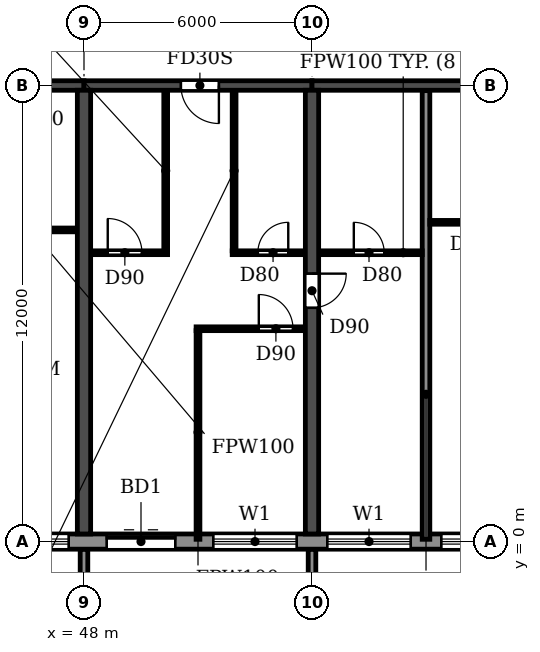
"""IFC4 building model, lengths in metres.
Left out: names, types, materials, properties, quantities, classifications, styles, units other than length and angle.
Written with IfcOpenShell. Run it as: python <this file> out.ifc"""

import sys

from ifc_helpers import new_model, si_unit, direction, frame, frame_2d, origin, place, context, subcontext, project, spatial, polyline, rectangle, outline, extrude, source, transform, mapped, element, fill, save


model = new_model("IFC4")
c1 = context("Model", 3, precision=1e-05, world=origin(), true_north=direction((0.0, 1.0)))
c2 = subcontext(c1, "Body", "Model", "MODEL_VIEW")
j1 = project(units=[si_unit("LENGTHUNIT", "METRE"), si_unit("PLANEANGLEUNIT", "RADIAN")], contexts=[c1])
p1 = place(None, origin())
s1 = spatial("IfcSite", under=j1, at=p1, CompositionType="ELEMENT")
p2 = place(p1, origin())
s2 = spatial("IfcBuilding", under=s1, at=p2, CompositionType="ELEMENT")
p3 = place(p2, frame((0.0, 0.0, 76.2)))
s3 = spatial("IfcBuildingStorey", under=s2, at=p3, CompositionType="ELEMENT", Elevation=76.2)
p4 = place(p3, frame((48.0, 0.2, 0.0), z_axis=(0.0, 0.0, 1.0), x_axis=(0.0, 1.0, 0.0)))
e1 = element("IfcWall", 1, at=p4, inside=s3, PredefinedType="SHEAR", context=c2, shape_type="SweptSolid", body=[
    extrude(rectangle(XDim=11.675, YDim=0.35, at=frame_2d((5.837, 0.0))), origin(), (0.0, 0.0, 1.0), 3.06),
])
p5 = place(p3, frame((54.0, 0.2, 0.0), z_axis=(0.0, 0.0, 1.0), x_axis=(0.0, 1.0, 0.0)))
e2 = element("IfcWall", 2, at=p5, inside=s3, PredefinedType="SHEAR", context=c2, shape_type="SweptSolid", body=[
    extrude(rectangle(XDim=11.675, YDim=0.35, at=frame_2d((5.837, 0.0))), origin(), (0.0, 0.0, 1.0), 3.06),
])
p6 = place(p5, frame((5.95, 0.0, 0.0)))
e3 = element("IfcOpeningElement", 3, at=p6, cuts=e2, PredefinedType="OPENING", context=c2, shape_type="SweptSolid", body=[
    extrude(rectangle(XDim=0.9, YDim=2.1, at=frame_2d((0.45, 1.05))), frame((0.0, 0.185, 0.0), z_axis=(0.0, -1.0, 0.0), x_axis=(1.0, 0.0, 0.0)), (0.0, 0.0, 1.0), 0.37),
])
p7 = place(p3, frame((42.0, 12.0, 0.0), z_axis=(0.0, 0.0, 1.0), x_axis=(1.0, 0.0, 0.0)))
e4 = element("IfcWall", 4, at=p7, inside=s3, PredefinedType="SHEAR", context=c2, shape_type="SweptSolid", body=[
    extrude(rectangle(XDim=6.0, YDim=0.25, at=frame_2d((3.0, 0.0))), origin(), (0.0, 0.0, 1.0), 2.46),
])
p8 = place(p7, frame((2.55, 0.0, 0.0)))
e5 = element("IfcOpeningElement", 5, at=p8, cuts=e4, PredefinedType="OPENING", context=c2, shape_type="SweptSolid", body=[
    extrude(rectangle(XDim=1.0, YDim=2.1, at=frame_2d((0.5, 1.05))), frame((0.0, 0.135, 0.0), z_axis=(0.0, -1.0, 0.0), x_axis=(1.0, 0.0, 0.0)), (0.0, 0.0, 1.0), 0.27),
])
p9 = place(p3, frame((48.0, 12.0, 0.0), z_axis=(0.0, 0.0, 1.0), x_axis=(1.0, 0.0, 0.0)))
e6 = element("IfcWall", 6, at=p9, inside=s3, PredefinedType="SHEAR", context=c2, shape_type="SweptSolid", body=[
    extrude(rectangle(XDim=6.0, YDim=0.25, at=frame_2d((3.0, 0.0))), origin(), (0.0, 0.0, 1.0), 2.46),
])
p10 = place(p9, frame((2.55, 0.0, 0.0)))
e7 = element("IfcOpeningElement", 7, at=p10, cuts=e6, PredefinedType="OPENING", context=c2, shape_type="SweptSolid", body=[
    extrude(rectangle(XDim=1.0, YDim=2.1, at=frame_2d((0.5, 1.05))), frame((0.0, 0.135, 0.0), z_axis=(0.0, -1.0, 0.0), x_axis=(1.0, 0.0, 0.0)), (0.0, 0.0, 1.0), 0.27),
])
p11 = place(p3, frame((54.0, 12.0, 0.0), z_axis=(0.0, 0.0, 1.0), x_axis=(1.0, 0.0, 0.0)))
e8 = element("IfcWall", 8, at=p11, inside=s3, PredefinedType="SHEAR", context=c2, shape_type="SweptSolid", body=[
    extrude(rectangle(XDim=6.0, YDim=0.25, at=frame_2d((3.0, 0.0))), origin(), (0.0, 0.0, 1.0), 2.46),
])
p12 = place(p3, frame((10.683, 0.0, 0.0), z_axis=(0.0, 0.0, 1.0), x_axis=(1.0, 0.0, 0.0)))
e9 = element("IfcWall", 9, at=p12, inside=s3, PredefinedType="STANDARD", context=c2, shape_type="SweptSolid", body=[
    extrude(rectangle(XDim=80.634, YDim=0.4, at=frame_2d((40.317, 0.0))), origin(), (0.0, 0.0, 1.0), 3.06),
])
p13 = place(p12, frame((1.717, 0.0, 0.9)))
e10 = element("IfcOpeningElement", 10, at=p13, cuts=e9, PredefinedType="OPENING", context=c2, shape_type="SweptSolid", body=[
    extrude(rectangle(XDim=2.2, YDim=1.5, at=frame_2d((1.1, 0.75))), frame((0.0, 0.21, 0.0), z_axis=(0.0, -1.0, 0.0), x_axis=(1.0, 0.0, 0.0)), (0.0, 0.0, 1.0), 0.42),
])
p14 = place(p12, frame((4.917, 0.0, 0.0)))
e11 = element("IfcOpeningElement", 11, at=p14, cuts=e9, PredefinedType="OPENING", context=c2, shape_type="SweptSolid", body=[
    extrude(rectangle(XDim=1.8, YDim=2.4, at=frame_2d((0.9, 1.2))), frame((0.0, 0.21, 0.0), z_axis=(0.0, -1.0, 0.0), x_axis=(1.0, 0.0, 0.0)), (0.0, 0.0, 1.0), 0.42),
])
p15 = place(p12, frame((7.717, 0.0, 0.9)))
e12 = element("IfcOpeningElement", 12, at=p15, cuts=e9, PredefinedType="OPENING", context=c2, shape_type="SweptSolid", body=[
    extrude(rectangle(XDim=2.2, YDim=1.5, at=frame_2d((1.1, 0.75))), frame((0.0, 0.21, 0.0), z_axis=(0.0, -1.0, 0.0), x_axis=(1.0, 0.0, 0.0)), (0.0, 0.0, 1.0), 0.42),
])
p16 = place(p12, frame((10.717, 0.0, 0.9)))
e13 = element("IfcOpeningElement", 13, at=p16, cuts=e9, PredefinedType="OPENING", context=c2, shape_type="SweptSolid", body=[
    extrude(rectangle(XDim=2.2, YDim=1.5, at=frame_2d((1.1, 0.75))), frame((0.0, 0.21, 0.0), z_axis=(0.0, -1.0, 0.0), x_axis=(1.0, 0.0, 0.0)), (0.0, 0.0, 1.0), 0.42),
])
p17 = place(p12, frame((13.717, 0.0, 0.9)))
e14 = element("IfcOpeningElement", 14, at=p17, cuts=e9, PredefinedType="OPENING", context=c2, shape_type="SweptSolid", body=[
    extrude(rectangle(XDim=2.2, YDim=1.5, at=frame_2d((1.1, 0.75))), frame((0.0, 0.21, 0.0), z_axis=(0.0, -1.0, 0.0), x_axis=(1.0, 0.0, 0.0)), (0.0, 0.0, 1.0), 0.42),
])
p18 = place(p12, frame((16.917, 0.0, 0.0)))
e15 = element("IfcOpeningElement", 15, at=p18, cuts=e9, PredefinedType="OPENING", context=c2, shape_type="SweptSolid", body=[
    extrude(rectangle(XDim=1.8, YDim=2.4, at=frame_2d((0.9, 1.2))), frame((0.0, 0.21, 0.0), z_axis=(0.0, -1.0, 0.0), x_axis=(1.0, 0.0, 0.0)), (0.0, 0.0, 1.0), 0.42),
])
p19 = place(p12, frame((19.717, 0.0, 0.9)))
e16 = element("IfcOpeningElement", 16, at=p19, cuts=e9, PredefinedType="OPENING", context=c2, shape_type="SweptSolid", body=[
    extrude(rectangle(XDim=2.2, YDim=1.5, at=frame_2d((1.1, 0.75))), frame((0.0, 0.21, 0.0), z_axis=(0.0, -1.0, 0.0), x_axis=(1.0, 0.0, 0.0)), (0.0, 0.0, 1.0), 0.42),
])
p20 = place(p12, frame((22.717, 0.0, 0.9)))
e17 = element("IfcOpeningElement", 17, at=p20, cuts=e9, PredefinedType="OPENING", context=c2, shape_type="SweptSolid", body=[
    extrude(rectangle(XDim=2.2, YDim=1.5, at=frame_2d((1.1, 0.75))), frame((0.0, 0.21, 0.0), z_axis=(0.0, -1.0, 0.0), x_axis=(1.0, 0.0, 0.0)), (0.0, 0.0, 1.0), 0.42),
])
p21 = place(p12, frame((25.917, 0.0, 0.0)))
e18 = element("IfcOpeningElement", 18, at=p21, cuts=e9, PredefinedType="OPENING", context=c2, shape_type="SweptSolid", body=[
    extrude(rectangle(XDim=1.8, YDim=2.4, at=frame_2d((0.9, 1.2))), frame((0.0, 0.21, 0.0), z_axis=(0.0, -1.0, 0.0), x_axis=(1.0, 0.0, 0.0)), (0.0, 0.0, 1.0), 0.42),
])
p22 = place(p12, frame((28.717, 0.0, 0.9)))
e19 = element("IfcOpeningElement", 19, at=p22, cuts=e9, PredefinedType="OPENING", context=c2, shape_type="SweptSolid", body=[
    extrude(rectangle(XDim=2.2, YDim=1.5, at=frame_2d((1.1, 0.75))), frame((0.0, 0.21, 0.0), z_axis=(0.0, -1.0, 0.0), x_axis=(1.0, 0.0, 0.0)), (0.0, 0.0, 1.0), 0.42),
])
p23 = place(p12, frame((31.717, 0.0, 0.9)))
e20 = element("IfcOpeningElement", 20, at=p23, cuts=e9, PredefinedType="OPENING", context=c2, shape_type="SweptSolid", body=[
    extrude(rectangle(XDim=2.2, YDim=1.5, at=frame_2d((1.1, 0.75))), frame((0.0, 0.21, 0.0), z_axis=(0.0, -1.0, 0.0), x_axis=(1.0, 0.0, 0.0)), (0.0, 0.0, 1.0), 0.42),
])
p24 = place(p12, frame((34.717, 0.0, 0.9)))
e21 = element("IfcOpeningElement", 21, at=p24, cuts=e9, PredefinedType="OPENING", context=c2, shape_type="SweptSolid", body=[
    extrude(rectangle(XDim=2.2, YDim=1.5, at=frame_2d((1.1, 0.75))), frame((0.0, 0.21, 0.0), z_axis=(0.0, -1.0, 0.0), x_axis=(1.0, 0.0, 0.0)), (0.0, 0.0, 1.0), 0.42),
])
p25 = place(p12, frame((37.917, 0.0, 0.0)))
e22 = element("IfcOpeningElement", 22, at=p25, cuts=e9, PredefinedType="OPENING", context=c2, shape_type="SweptSolid", body=[
    extrude(rectangle(XDim=1.8, YDim=2.4, at=frame_2d((0.9, 1.2))), frame((0.0, 0.21, 0.0), z_axis=(0.0, -1.0, 0.0), x_axis=(1.0, 0.0, 0.0)), (0.0, 0.0, 1.0), 0.42),
])
p26 = place(p12, frame((40.717, 0.0, 0.9)))
e23 = element("IfcOpeningElement", 23, at=p26, cuts=e9, PredefinedType="OPENING", context=c2, shape_type="SweptSolid", body=[
    extrude(rectangle(XDim=2.2, YDim=1.5, at=frame_2d((1.1, 0.75))), frame((0.0, 0.21, 0.0), z_axis=(0.0, -1.0, 0.0), x_axis=(1.0, 0.0, 0.0)), (0.0, 0.0, 1.0), 0.42),
])
p27 = place(p12, frame((43.717, 0.0, 0.9)))
e24 = element("IfcOpeningElement", 24, at=p27, cuts=e9, PredefinedType="OPENING", context=c2, shape_type="SweptSolid", body=[
    extrude(rectangle(XDim=2.2, YDim=1.5, at=frame_2d((1.1, 0.75))), frame((0.0, 0.21, 0.0), z_axis=(0.0, -1.0, 0.0), x_axis=(1.0, 0.0, 0.0)), (0.0, 0.0, 1.0), 0.42),
])
p28 = place(p12, frame((46.717, 0.0, 0.9)))
e25 = element("IfcOpeningElement", 25, at=p28, cuts=e9, PredefinedType="OPENING", context=c2, shape_type="SweptSolid", body=[
    extrude(rectangle(XDim=2.2, YDim=1.5, at=frame_2d((1.1, 0.75))), frame((0.0, 0.21, 0.0), z_axis=(0.0, -1.0, 0.0), x_axis=(1.0, 0.0, 0.0)), (0.0, 0.0, 1.0), 0.42),
])
p29 = place(p12, frame((49.917, 0.0, 0.0)))
e26 = element("IfcOpeningElement", 26, at=p29, cuts=e9, PredefinedType="OPENING", context=c2, shape_type="SweptSolid", body=[
    extrude(rectangle(XDim=1.8, YDim=2.4, at=frame_2d((0.9, 1.2))), frame((0.0, 0.21, 0.0), z_axis=(0.0, -1.0, 0.0), x_axis=(1.0, 0.0, 0.0)), (0.0, 0.0, 1.0), 0.42),
])
p30 = place(p12, frame((52.717, 0.0, 0.9)))
e27 = element("IfcOpeningElement", 27, at=p30, cuts=e9, PredefinedType="OPENING", context=c2, shape_type="SweptSolid", body=[
    extrude(rectangle(XDim=2.2, YDim=1.5, at=frame_2d((1.1, 0.75))), frame((0.0, 0.21, 0.0), z_axis=(0.0, -1.0, 0.0), x_axis=(1.0, 0.0, 0.0)), (0.0, 0.0, 1.0), 0.42),
])
p31 = place(p12, frame((55.717, 0.0, 0.9)))
e28 = element("IfcOpeningElement", 28, at=p31, cuts=e9, PredefinedType="OPENING", context=c2, shape_type="SweptSolid", body=[
    extrude(rectangle(XDim=2.2, YDim=1.5, at=frame_2d((1.1, 0.75))), frame((0.0, 0.21, 0.0), z_axis=(0.0, -1.0, 0.0), x_axis=(1.0, 0.0, 0.0)), (0.0, 0.0, 1.0), 0.42),
])
p32 = place(p12, frame((58.717, 0.0, 0.9)))
e29 = element("IfcOpeningElement", 29, at=p32, cuts=e9, PredefinedType="OPENING", context=c2, shape_type="SweptSolid", body=[
    extrude(rectangle(XDim=2.2, YDim=1.5, at=frame_2d((1.1, 0.75))), frame((0.0, 0.21, 0.0), z_axis=(0.0, -1.0, 0.0), x_axis=(1.0, 0.0, 0.0)), (0.0, 0.0, 1.0), 0.42),
])
p33 = place(p12, frame((61.717, 0.0, 0.9)))
e30 = element("IfcOpeningElement", 30, at=p33, cuts=e9, PredefinedType="OPENING", context=c2, shape_type="SweptSolid", body=[
    extrude(rectangle(XDim=2.2, YDim=1.5, at=frame_2d((1.1, 0.75))), frame((0.0, 0.21, 0.0), z_axis=(0.0, -1.0, 0.0), x_axis=(1.0, 0.0, 0.0)), (0.0, 0.0, 1.0), 0.42),
])
p34 = place(p12, frame((64.917, 0.0, 0.0)))
e31 = element("IfcOpeningElement", 31, at=p34, cuts=e9, PredefinedType="OPENING", context=c2, shape_type="SweptSolid", body=[
    extrude(rectangle(XDim=1.8, YDim=2.4, at=frame_2d((0.9, 1.2))), frame((0.0, 0.21, 0.0), z_axis=(0.0, -1.0, 0.0), x_axis=(1.0, 0.0, 0.0)), (0.0, 0.0, 1.0), 0.42),
])
p35 = place(p12, frame((67.717, 0.0, 0.9)))
e32 = element("IfcOpeningElement", 32, at=p35, cuts=e9, PredefinedType="OPENING", context=c2, shape_type="SweptSolid", body=[
    extrude(rectangle(XDim=2.2, YDim=1.5, at=frame_2d((1.1, 0.75))), frame((0.0, 0.21, 0.0), z_axis=(0.0, -1.0, 0.0), x_axis=(1.0, 0.0, 0.0)), (0.0, 0.0, 1.0), 0.42),
])
p36 = place(p12, frame((70.717, 0.0, 0.9)))
e33 = element("IfcOpeningElement", 33, at=p36, cuts=e9, PredefinedType="OPENING", context=c2, shape_type="SweptSolid", body=[
    extrude(rectangle(XDim=2.2, YDim=1.5, at=frame_2d((1.1, 0.75))), frame((0.0, 0.21, 0.0), z_axis=(0.0, -1.0, 0.0), x_axis=(1.0, 0.0, 0.0)), (0.0, 0.0, 1.0), 0.42),
])
p37 = place(p12, frame((73.917, 0.0, 0.0)))
e34 = element("IfcOpeningElement", 34, at=p37, cuts=e9, PredefinedType="OPENING", context=c2, shape_type="SweptSolid", body=[
    extrude(rectangle(XDim=1.8, YDim=2.4, at=frame_2d((0.9, 1.2))), frame((0.0, 0.21, 0.0), z_axis=(0.0, -1.0, 0.0), x_axis=(1.0, 0.0, 0.0)), (0.0, 0.0, 1.0), 0.42),
])
p38 = place(p12, frame((76.717, 0.0, 0.9)))
e35 = element("IfcOpeningElement", 35, at=p38, cuts=e9, PredefinedType="OPENING", context=c2, shape_type="SweptSolid", body=[
    extrude(rectangle(XDim=2.2, YDim=1.5, at=frame_2d((1.1, 0.75))), frame((0.0, 0.21, 0.0), z_axis=(0.0, -1.0, 0.0), x_axis=(1.0, 0.0, 0.0)), (0.0, 0.0, 1.0), 0.42),
])
m1 = source(origin(), c2, "Body", "SweptSolid", [
    extrude(outline(polyline([(0.0, 0.0), (0.2, 0.0), (0.2, 1.65), (0.0, 1.65), (0.0, 0.0)])), origin(), (0.0, 0.0, 1.0), 3.1),
])
for number, where in (
    (36, (47.9, -1.85, 0.0)),
    (37, (53.9, -1.85, 0.0)),
):
    element("IfcWall", number, at=place(p3, frame(where)), inside=s3, PredefinedType="STANDARD", context=c2, shape_type="MappedRepresentation", body=[
        mapped(m1, transform((0.0, 0.0, 0.0))),
    ])
p39 = place(p3, frame((57.0, 0.06, 0.0), z_axis=(0.0, 0.0, 1.0), x_axis=(0.0, 1.0, 0.0)))
e38 = element("IfcWall", 38, at=p39, inside=s3, PredefinedType="PARTITIONING", context=c2, shape_type="SweptSolid", body=[
    extrude(rectangle(XDim=11.805, YDim=0.2, at=frame_2d((5.902, 0.0))), origin(), (0.0, 0.0, 1.0), 3.06),
])
p40 = place(p3, frame((50.95, 5.6, 0.0), z_axis=(0.0, 0.0, 1.0), x_axis=(1.0, 0.0, 0.0)))
e39 = element("IfcWall", 39, at=p40, inside=s3, PredefinedType="PARTITIONING", context=c2, shape_type="SweptSolid", body=[
    extrude(rectangle(XDim=2.865, YDim=0.1, at=frame_2d((1.433, 0.0))), origin(), (0.0, 0.0, 1.0), 3.06),
])
p41 = place(p40, frame((1.65, 0.0, 0.0)))
e40 = element("IfcOpeningElement", 40, at=p41, cuts=e39, PredefinedType="OPENING", context=c2, shape_type="SweptSolid", body=[
    extrude(rectangle(XDim=0.9, YDim=2.1, at=frame_2d((0.45, 1.05))), frame((0.0, 0.06, 0.0), z_axis=(0.0, -1.0, 0.0), x_axis=(1.0, 0.0, 0.0)), (0.0, 0.0, 1.0), 0.12),
])
p42 = place(p3, frame((48.185, 7.6, 0.0), z_axis=(0.0, 0.0, 1.0), x_axis=(1.0, 0.0, 0.0)))
e41 = element("IfcWall", 41, at=p42, inside=s3, PredefinedType="PARTITIONING", context=c2, shape_type="SweptSolid", body=[
    extrude(rectangle(XDim=2.015, YDim=0.1, at=frame_2d((1.007, 0.0))), origin(), (0.0, 0.0, 1.0), 3.06),
])
p43 = place(p42, frame((0.44, 0.0, 0.0)))
e42 = element("IfcOpeningElement", 42, at=p43, cuts=e41, PredefinedType="OPENING", context=c2, shape_type="SweptSolid", body=[
    extrude(rectangle(XDim=0.9, YDim=2.1, at=frame_2d((0.45, 1.05))), frame((0.0, 0.06, 0.0), z_axis=(0.0, -1.0, 0.0), x_axis=(1.0, 0.0, 0.0)), (0.0, 0.0, 1.0), 0.12),
])
p44 = place(p3, frame((51.9, 7.6, 0.0), z_axis=(0.0, 0.0, 1.0), x_axis=(1.0, 0.0, 0.0)))
e43 = element("IfcWall", 43, at=p44, inside=s3, PredefinedType="PARTITIONING", context=c2, shape_type="SweptSolid", body=[
    extrude(rectangle(XDim=1.915, YDim=0.1, at=frame_2d((0.958, 0.0))), origin(), (0.0, 0.0, 1.0), 3.06),
])
p45 = place(p44, frame((0.675, 0.0, 0.0)))
e44 = element("IfcOpeningElement", 44, at=p45, cuts=e43, PredefinedType="OPENING", context=c2, shape_type="SweptSolid", body=[
    extrude(rectangle(XDim=0.8, YDim=2.1, at=frame_2d((0.4, 1.05))), frame((0.0, 0.06, 0.0), z_axis=(0.0, -1.0, 0.0), x_axis=(1.0, 0.0, 0.0)), (0.0, 0.0, 1.0), 0.12),
])
p46 = place(p3, frame((54.185, 7.6, 0.0), z_axis=(0.0, 0.0, 1.0), x_axis=(1.0, 0.0, 0.0)))
e45 = element("IfcWall", 45, at=p46, inside=s3, PredefinedType="PARTITIONING", context=c2, shape_type="SweptSolid", body=[
    extrude(rectangle(XDim=2.715, YDim=0.1, at=frame_2d((1.357, 0.0))), origin(), (0.0, 0.0, 1.0), 3.06),
])
p47 = place(p46, frame((0.915, 0.0, 0.0)))
e46 = element("IfcOpeningElement", 46, at=p47, cuts=e45, PredefinedType="OPENING", context=c2, shape_type="SweptSolid", body=[
    extrude(rectangle(XDim=0.8, YDim=2.1, at=frame_2d((0.4, 1.05))), frame((0.0, 0.06, 0.0), z_axis=(0.0, -1.0, 0.0), x_axis=(1.0, 0.0, 0.0)), (0.0, 0.0, 1.0), 0.12),
])
p48 = place(p3, frame((45.9, 8.2, 0.0), z_axis=(0.0, 0.0, 1.0), x_axis=(1.0, 0.0, 0.0)))
e47 = element("IfcWall", 47, at=p48, inside=s3, PredefinedType="PARTITIONING", context=c2, shape_type="SweptSolid", body=[
    extrude(rectangle(XDim=1.915, YDim=0.1, at=frame_2d((0.958, 0.0))), origin(), (0.0, 0.0, 1.0), 3.06),
])
p49 = place(p3, frame((57.1, 8.4, 0.0), z_axis=(0.0, 0.0, 1.0), x_axis=(1.0, 0.0, 0.0)))
e48 = element("IfcWall", 48, at=p49, inside=s3, PredefinedType="PARTITIONING", context=c2, shape_type="SweptSolid", body=[
    extrude(rectangle(XDim=2.715, YDim=0.1, at=frame_2d((1.357, 0.0))), origin(), (0.0, 0.0, 1.0), 3.06),
])
p50 = place(p49, frame((1.0, 0.0, 0.0)))
e49 = element("IfcOpeningElement", 49, at=p50, cuts=e48, PredefinedType="OPENING", context=c2, shape_type="SweptSolid", body=[
    extrude(rectangle(XDim=0.8, YDim=2.1, at=frame_2d((0.4, 1.05))), frame((0.0, 0.06, 0.0), z_axis=(0.0, -1.0, 0.0), x_axis=(1.0, 0.0, 0.0)), (0.0, 0.0, 1.0), 0.12),
])
p51 = place(p3, frame((50.15, 7.65, 0.0), z_axis=(0.0, 0.0, 1.0), x_axis=(0.0, 1.0, 0.0)))
e50 = element("IfcWall", 50, at=p51, inside=s3, PredefinedType="PARTITIONING", context=c2, shape_type="SweptSolid", body=[
    extrude(rectangle(XDim=4.215, YDim=0.1, at=frame_2d((2.107, 0.0))), origin(), (0.0, 0.0, 1.0), 3.06),
])
p52 = place(p3, frame((51.0, 0.06, 0.0), z_axis=(0.0, 0.0, 1.0), x_axis=(0.0, 1.0, 0.0)))
e51 = element("IfcWall", 51, at=p52, inside=s3, PredefinedType="PARTITIONING", context=c2, shape_type="SweptSolid", body=[
    extrude(rectangle(XDim=5.49, YDim=0.1, at=frame_2d((2.745, 0.0))), origin(), (0.0, 0.0, 1.0), 3.06),
])
p53 = place(p3, frame((51.95, 7.65, 0.0), z_axis=(0.0, 0.0, 1.0), x_axis=(0.0, 1.0, 0.0)))
e52 = element("IfcWall", 52, at=p53, inside=s3, PredefinedType="PARTITIONING", context=c2, shape_type="SweptSolid", body=[
    extrude(rectangle(XDim=4.215, YDim=0.1, at=frame_2d((2.107, 0.0))), origin(), (0.0, 0.0, 1.0), 3.06),
])
p54 = place(p24, origin())
e53 = element("IfcWindow", 53, at=p54, inside=s3, PartitioningType="DOUBLE_PANEL_HORIZONTAL", PredefinedType="WINDOW", context=c2, shape_type="SweptSolid", body=[
    extrude(rectangle(XDim=2.2, YDim=1.5, at=frame_2d((1.1, 0.75))), frame((0.0, 0.03, 0.0), z_axis=(0.0, -1.0, 0.0), x_axis=(1.0, 0.0, 0.0)), (0.0, 0.0, 1.0), 0.06),
])
fill(e21, e53)
p55 = place(p25, origin())
e54 = element("IfcDoor", 54, at=p55, inside=s3, OperationType="DOUBLE_DOOR_SLIDING", PredefinedType="DOOR", context=c2, shape_type="SweptSolid", body=[
    extrude(rectangle(XDim=1.8, YDim=2.4, at=frame_2d((0.9, 1.2))), frame((0.0, 0.025, 0.0), z_axis=(0.0, -1.0, 0.0), x_axis=(1.0, 0.0, 0.0)), (0.0, 0.0, 1.0), 0.05),
])
fill(e22, e54)
p56 = place(p26, origin())
e55 = element("IfcWindow", 55, at=p56, inside=s3, PartitioningType="DOUBLE_PANEL_HORIZONTAL", PredefinedType="WINDOW", context=c2, shape_type="SweptSolid", body=[
    extrude(rectangle(XDim=2.2, YDim=1.5, at=frame_2d((1.1, 0.75))), frame((0.0, 0.03, 0.0), z_axis=(0.0, -1.0, 0.0), x_axis=(1.0, 0.0, 0.0)), (0.0, 0.0, 1.0), 0.06),
])
fill(e23, e55)
p57 = place(p27, origin())
e56 = element("IfcWindow", 56, at=p57, inside=s3, PartitioningType="DOUBLE_PANEL_HORIZONTAL", PredefinedType="WINDOW", context=c2, shape_type="SweptSolid", body=[
    extrude(rectangle(XDim=2.2, YDim=1.5, at=frame_2d((1.1, 0.75))), frame((0.0, 0.03, 0.0), z_axis=(0.0, -1.0, 0.0), x_axis=(1.0, 0.0, 0.0)), (0.0, 0.0, 1.0), 0.06),
])
fill(e24, e56)
p58 = place(p28, origin())
e57 = element("IfcWindow", 57, at=p58, inside=s3, PartitioningType="DOUBLE_PANEL_HORIZONTAL", PredefinedType="WINDOW", context=c2, shape_type="SweptSolid", body=[
    extrude(rectangle(XDim=2.2, YDim=1.5, at=frame_2d((1.1, 0.75))), frame((0.0, 0.03, 0.0), z_axis=(0.0, -1.0, 0.0), x_axis=(1.0, 0.0, 0.0)), (0.0, 0.0, 1.0), 0.06),
])
fill(e25, e57)
p59 = place(p47, origin())
e58 = element("IfcDoor", 58, at=p59, inside=s3, OperationType="SINGLE_SWING_LEFT", PredefinedType="DOOR", context=c2, shape_type="SweptSolid", body=[
    extrude(rectangle(XDim=0.8, YDim=2.1, at=frame_2d((0.4, 1.05))), frame((0.0, 0.025, 0.0), z_axis=(0.0, -1.0, 0.0), x_axis=(1.0, 0.0, 0.0)), (0.0, 0.0, 1.0), 0.05),
])
fill(e46, e58)
p60 = place(p43, origin())
e59 = element("IfcDoor", 59, at=p60, inside=s3, OperationType="SINGLE_SWING_LEFT", PredefinedType="DOOR", context=c2, shape_type="SweptSolid", body=[
    extrude(rectangle(XDim=0.9, YDim=2.1, at=frame_2d((0.45, 1.05))), frame((0.0, 0.025, 0.0), z_axis=(0.0, -1.0, 0.0), x_axis=(1.0, 0.0, 0.0)), (0.0, 0.0, 1.0), 0.05),
])
fill(e42, e59)
p61 = place(p10, frame((1.0, 0.0, 0.0), z_axis=(0.0, 0.0, 1.0), x_axis=(-1.0, 0.0, 0.0)))
e60 = element("IfcDoor", 60, at=p61, inside=s3, OperationType="SINGLE_SWING_LEFT", PredefinedType="DOOR", context=c2, shape_type="SweptSolid", body=[
    extrude(rectangle(XDim=1.0, YDim=2.1, at=frame_2d((0.5, 1.05))), frame((0.0, 0.025, 0.0), z_axis=(0.0, -1.0, 0.0), x_axis=(1.0, 0.0, 0.0)), (0.0, 0.0, 1.0), 0.05),
])
fill(e7, e60)
p62 = place(p45, origin())
e61 = element("IfcDoor", 61, at=p62, inside=s3, OperationType="SINGLE_SWING_RIGHT", PredefinedType="DOOR", context=c2, shape_type="SweptSolid", body=[
    extrude(rectangle(XDim=0.8, YDim=2.1, at=frame_2d((0.4, 1.05))), frame((0.0, 0.025, 0.0), z_axis=(0.0, -1.0, 0.0), x_axis=(1.0, 0.0, 0.0)), (0.0, 0.0, 1.0), 0.05),
])
fill(e44, e61)
p63 = place(p41, origin())
e62 = element("IfcDoor", 62, at=p63, inside=s3, OperationType="SINGLE_SWING_LEFT", PredefinedType="DOOR", context=c2, shape_type="SweptSolid", body=[
    extrude(rectangle(XDim=0.9, YDim=2.1, at=frame_2d((0.45, 1.05))), frame((0.0, 0.025, 0.0), z_axis=(0.0, -1.0, 0.0), x_axis=(1.0, 0.0, 0.0)), (0.0, 0.0, 1.0), 0.05),
])
fill(e40, e62)
p64 = place(p6, frame((0.9, 0.0, 0.0), z_axis=(0.0, 0.0, 1.0), x_axis=(-1.0, 0.0, 0.0)))
e63 = element("IfcDoor", 63, at=p64, inside=s3, OperationType="SINGLE_SWING_LEFT", PredefinedType="DOOR", context=c2, shape_type="SweptSolid", body=[
    extrude(rectangle(XDim=0.9, YDim=2.1, at=frame_2d((0.45, 1.05))), frame((0.0, 0.025, 0.0), z_axis=(0.0, -1.0, 0.0), x_axis=(1.0, 0.0, 0.0)), (0.0, 0.0, 1.0), 0.05),
])
fill(e3, e63)
save(model, sys.argv[1])
